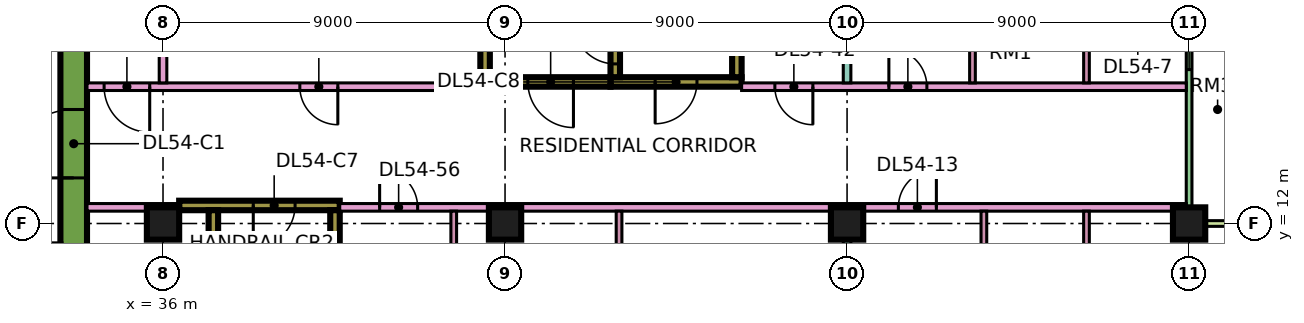
"""IFC4 building model, lengths in metres.
Left out: names, types, materials, properties, quantities, classifications, styles, units other than length and angle.
Written with IfcOpenShell. Run it as: python <this file> out.ifc"""

import sys

from ifc_helpers import new_model, si_unit, direction, frame, frame_2d, origin, origin_2d, place, context, subcontext, project, spatial, rectangle, extrude, element, fill, save


model = new_model("IFC4")
c1 = context("Model", 3, precision=1e-05, world=origin(), true_north=direction((0.0, 1.0)))
c2 = subcontext(c1, "Body", "Model", "MODEL_VIEW")
j1 = project(units=[si_unit("LENGTHUNIT", "METRE"), si_unit("PLANEANGLEUNIT", "RADIAN")], contexts=[c1])
p1 = place(None, origin())
s1 = spatial("IfcSite", under=j1, at=p1, CompositionType="ELEMENT")
p2 = place(p1, origin())
s2 = spatial("IfcBuilding", under=s1, at=p2, CompositionType="ELEMENT")
p3 = place(p2, frame((0.0, 0.0, 230.4)))
s3 = spatial("IfcBuildingStorey", under=s2, at=p3, CompositionType="ELEMENT", Elevation=230.4)
for number, where, z_axis, x_axis in (
    (1, (36.0, 12.0, 0.0), (0.0, 0.0, 1.0), (1.0, 0.0, 0.0)),
    (2, (45.0, 12.0, 0.0), (0.0, 0.0, 1.0), (1.0, 0.0, 0.0)),
    (3, (54.0, 12.0, 0.0), (0.0, 0.0, 1.0), (1.0, 0.0, 0.0)),
    (4, (63.0, 12.0, 0.0), (0.0, 0.0, 1.0), (1.0, 0.0, 0.0)),
):
    element("IfcColumn", number, at=place(p3, frame(where, z_axis=z_axis, x_axis=x_axis)), inside=s3, PredefinedType="COLUMN", context=c2, shape_type="SweptSolid", body=[
        extrude(rectangle(XDim=0.85, YDim=0.85, at=origin_2d()), origin(), (0.0, 0.0, 1.0), 3.75),
    ])
p4 = place(p3, frame((33.65, 7.7, 0.0), z_axis=(0.0, 0.0, 1.0), x_axis=(0.0, 1.0, 0.0)))
e5 = element("IfcWall", 5, at=p4, inside=s3, PredefinedType="SHEAR", context=c2, shape_type="SweptSolid", body=[
    extrude(rectangle(XDim=11.6, YDim=0.7, at=frame_2d((5.8, 0.0))), origin(), (0.0, 0.0, 1.0), 3.75),
])
p5 = place(p4, frame((5.5, 0.0, 0.0)))
e6 = element("IfcOpeningElement", 6, at=p5, cuts=e5, PredefinedType="OPENING", context=c2, shape_type="SweptSolid", body=[
    extrude(rectangle(XDim=1.8, YDim=2.4, at=frame_2d((0.9, 1.2))), frame((0.0, 0.36, 0.0), z_axis=(0.0, -1.0, 0.0), x_axis=(1.0, 0.0, 0.0)), (0.0, 0.0, 1.0), 0.72),
])
p6 = place(p3, frame((36.425, 12.475, 0.0), z_axis=(0.0, 0.0, 1.0), x_axis=(1.0, 0.0, 0.0)))
e7 = element("IfcWall", 7, at=p6, inside=s3, PredefinedType="SHEAR", context=c2, shape_type="SweptSolid", body=[
    extrude(rectangle(XDim=4.225, YDim=0.25, at=frame_2d((2.112, 0.0))), origin(), (0.0, 0.0, 1.0), 3.75),
])
p7 = place(p6, frame((1.95, 0.0, 0.0)))
e8 = element("IfcOpeningElement", 8, at=p7, cuts=e7, PredefinedType="OPENING", context=c2, shape_type="SweptSolid", body=[
    extrude(rectangle(XDim=1.1, YDim=2.2, at=frame_2d((0.55, 1.1))), frame((0.0, 0.135, 0.0), z_axis=(0.0, -1.0, 0.0), x_axis=(1.0, 0.0, 0.0)), (0.0, 0.0, 1.0), 0.27),
])
for number, where, z_axis, x_axis in (
    (9, (37.325, 5.85, 0.0), (0.0, 0.0, 1.0), (0.0, 1.0, 0.0)),
    (10, (40.525, 5.85, 0.0), (0.0, 0.0, 1.0), (0.0, 1.0, 0.0)),
):
    element("IfcWall", number, at=place(p3, frame(where, z_axis=z_axis, x_axis=x_axis)), inside=s3, PredefinedType="SHEAR", context=c2, shape_type="SweptSolid", body=[
        extrude(rectangle(XDim=6.5, YDim=0.25, at=frame_2d((3.25, 0.0))), origin(), (0.0, 0.0, 1.0), 3.75),
    ])
p8 = place(p3, frame((47.775, 15.725, 0.0), z_axis=(0.0, 0.0, 1.0), x_axis=(1.0, 0.0, 0.0)))
e11 = element("IfcWall", 11, at=p8, inside=s3, PredefinedType="SHEAR", context=c2, shape_type="SweptSolid", body=[
    extrude(rectangle(XDim=3.45, YDim=0.25, at=frame_2d((1.725, 0.0))), origin(), (0.0, 0.0, 1.0), 3.75),
])
p9 = place(p8, frame((1.175, 0.0, 0.0)))
e12 = element("IfcOpeningElement", 12, at=p9, cuts=e11, PredefinedType="OPENING", context=c2, shape_type="SweptSolid", body=[
    extrude(rectangle(XDim=1.1, YDim=2.2, at=frame_2d((0.55, 1.1))), frame((0.0, 0.135, 0.0), z_axis=(0.0, -1.0, 0.0), x_axis=(1.0, 0.0, 0.0)), (0.0, 0.0, 1.0), 0.27),
])
p10 = place(p3, frame((47.9, 15.85, 0.0), z_axis=(0.0, 0.0, 1.0), x_axis=(0.0, 1.0, 0.0)))
e13 = element("IfcWall", 13, at=p10, inside=s3, PredefinedType="SHEAR", context=c2, shape_type="SweptSolid", body=[
    extrude(rectangle(XDim=6.5, YDim=0.25, at=frame_2d((3.25, 0.0))), origin(), (0.0, 0.0, 1.0), 3.75),
])
p11 = place(p10, frame((0.35, 0.0, 0.0)))
e14 = element("IfcOpeningElement", 14, at=p11, cuts=e13, PredefinedType="OPENING", context=c2, shape_type="SweptSolid", body=[
    extrude(rectangle(XDim=1.1, YDim=2.2, at=frame_2d((0.55, 1.1))), frame((0.0, 0.135, 0.0), z_axis=(0.0, -1.0, 0.0), x_axis=(1.0, 0.0, 0.0)), (0.0, 0.0, 1.0), 0.27),
])
p12 = place(p3, frame((51.1, 15.85, 0.0), z_axis=(0.0, 0.0, 1.0), x_axis=(0.0, 1.0, 0.0)))
e15 = element("IfcWall", 15, at=p12, inside=s3, PredefinedType="SHEAR", context=c2, shape_type="SweptSolid", body=[
    extrude(rectangle(XDim=6.5, YDim=0.25, at=frame_2d((3.25, 0.0))), origin(), (0.0, 0.0, 1.0), 3.75),
])
p13 = place(p3, frame((44.35, 15.725, 0.0), z_axis=(0.0, 0.0, 1.0), x_axis=(1.0, 0.0, 0.0)))
e16 = element("IfcWall", 16, at=p13, inside=s3, PredefinedType="SHEAR", context=c2, shape_type="SweptSolid", body=[
    extrude(rectangle(XDim=3.425, YDim=0.25, at=frame_2d((1.712, 0.0))), origin(), (0.0, 0.0, 1.0), 3.75),
])
p14 = place(p13, frame((1.25, 0.0, 0.0)))
e17 = element("IfcOpeningElement", 17, at=p14, cuts=e16, PredefinedType="OPENING", context=c2, shape_type="SweptSolid", body=[
    extrude(rectangle(XDim=1.2, YDim=2.2, at=frame_2d((0.6, 1.1))), frame((0.0, 0.135, 0.0), z_axis=(0.0, -1.0, 0.0), x_axis=(1.0, 0.0, 0.0)), (0.0, 0.0, 1.0), 0.27),
])
p15 = place(p3, frame((44.475, 15.85, 0.0), z_axis=(0.0, 0.0, 1.0), x_axis=(0.0, 1.0, 0.0)))
e18 = element("IfcWall", 18, at=p15, inside=s3, PredefinedType="SHEAR", context=c2, shape_type="SweptSolid", body=[
    extrude(rectangle(XDim=6.5, YDim=0.25, at=frame_2d((3.25, 0.0))), origin(), (0.0, 0.0, 1.0), 3.75),
])
p16 = place(p15, frame((1.75, 0.0, 0.0)))
e19 = element("IfcOpeningElement", 19, at=p16, cuts=e18, PredefinedType="OPENING", context=c2, shape_type="SweptSolid", body=[
    extrude(rectangle(XDim=1.1, YDim=2.2, at=frame_2d((0.55, 1.1))), frame((0.0, 0.135, 0.0), z_axis=(0.0, -1.0, 0.0), x_axis=(1.0, 0.0, 0.0)), (0.0, 0.0, 1.0), 0.27),
])
p17 = place(p15, frame((4.3, 0.0, 0.0)))
e20 = element("IfcOpeningElement", 20, at=p17, cuts=e18, PredefinedType="OPENING", context=c2, shape_type="SweptSolid", body=[
    extrude(rectangle(XDim=1.1, YDim=2.2, at=frame_2d((0.55, 1.1))), frame((0.0, 0.135, 0.0), z_axis=(0.0, -1.0, 0.0), x_axis=(1.0, 0.0, 0.0)), (0.0, 0.0, 1.0), 0.27),
])
p18 = place(p3, frame((63.0, 12.075, 0.0), z_axis=(0.0, 0.0, 1.0), x_axis=(0.0, 1.0, 0.0)))
e21 = element("IfcWall", 21, at=p18, inside=s3, PredefinedType="SOLIDWALL", context=c2, shape_type="SweptSolid", body=[
    extrude(rectangle(XDim=10.35, YDim=0.15, at=frame_2d((5.175, 0.0))), origin(), (0.0, 0.0, 1.0), 3.35),
])
p19 = place(p18, frame((3.975, 0.0, 0.45)))
e22 = element("IfcOpeningElement", 22, at=p19, cuts=e21, PredefinedType="OPENING", context=c2, shape_type="SweptSolid", body=[
    extrude(rectangle(XDim=1.8, YDim=2.4, at=frame_2d((0.9, 1.2))), frame((0.0, 0.085, 0.0), z_axis=(0.0, -1.0, 0.0), x_axis=(1.0, 0.0, 0.0)), (0.0, 0.0, 1.0), 0.17),
])
p20 = place(p18, frame((7.387, 0.0, 0.0)))
e23 = element("IfcOpeningElement", 23, at=p20, cuts=e21, PredefinedType="OPENING", context=c2, shape_type="SweptSolid", body=[
    extrude(rectangle(XDim=1.8, YDim=2.4, at=frame_2d((0.9, 1.2))), frame((0.0, 0.085, 0.0), z_axis=(0.0, -1.0, 0.0), x_axis=(1.0, 0.0, 0.0)), (0.0, 0.0, 1.0), 0.17),
])
p21 = place(p3, frame((64.5, 12.0, 0.0), z_axis=(0.0, 0.0, 1.0), x_axis=(-1.0, 0.0, 0.0)))
e24 = element("IfcWall", 24, at=p21, inside=s3, PredefinedType="SOLIDWALL", context=c2, shape_type="SweptSolid", body=[
    extrude(rectangle(XDim=1.5, YDim=0.15, at=frame_2d((0.75, 0.0))), origin(), (0.0, 0.0, 1.0), 3.35),
])
p22 = place(p3, frame((34.0, 12.425, 0.0), z_axis=(0.0, 0.0, 1.0), x_axis=(1.0, 0.0, 0.0)))
e25 = element("IfcWall", 25, at=p22, inside=s3, PredefinedType="PARTITIONING", context=c2, shape_type="SweptSolid", body=[
    extrude(rectangle(XDim=2.426, YDim=0.2, at=frame_2d((1.213, 0.0))), origin(), (0.0, 0.0, 1.0), 3.35),
])
p23 = place(p3, frame((34.0, 15.6, 0.0), z_axis=(0.0, 0.0, 1.0), x_axis=(1.0, 0.0, 0.0)))
e26 = element("IfcWall", 26, at=p23, inside=s3, PredefinedType="PARTITIONING", context=c2, shape_type="SweptSolid", body=[
    extrude(rectangle(XDim=10.35, YDim=0.2, at=frame_2d((5.175, 0.0))), origin(), (0.0, 0.0, 1.0), 3.35),
])
p24 = place(p23, frame((5.6, 0.0, 0.0)))
e27 = element("IfcOpeningElement", 27, at=p24, cuts=e26, PredefinedType="OPENING", context=c2, shape_type="SweptSolid", body=[
    extrude(rectangle(XDim=1.0, YDim=2.1, at=frame_2d((0.5, 1.05))), frame((0.0, 0.11, 0.0), z_axis=(0.0, -1.0, 0.0), x_axis=(1.0, 0.0, 0.0)), (0.0, 0.0, 1.0), 0.22),
])
p25 = place(p23, frame((0.45, 0.0, 0.0)))
e28 = element("IfcOpeningElement", 28, at=p25, cuts=e26, PredefinedType="OPENING", context=c2, shape_type="SweptSolid", body=[
    extrude(rectangle(XDim=1.2, YDim=2.1, at=frame_2d((0.6, 1.05))), frame((0.0, 0.11, 0.0), z_axis=(0.0, -1.0, 0.0), x_axis=(1.0, 0.0, 0.0)), (0.0, 0.0, 1.0), 0.22),
])
p26 = place(p3, frame((36.0, 15.7, 0.0), z_axis=(0.0, 0.0, 1.0), x_axis=(0.0, 1.0, 0.0)))
e29 = element("IfcWall", 29, at=p26, inside=s3, PredefinedType="PARTITIONING", context=c2, shape_type="SweptSolid", body=[
    extrude(rectangle(XDim=8.3, YDim=0.2, at=frame_2d((4.15, 0.0))), origin(), (0.0, 0.0, 1.0), 3.35),
])
p27 = place(p3, frame((40.65, 12.425, 0.0), z_axis=(0.0, 0.0, 1.0), x_axis=(1.0, 0.0, 0.0)))
e30 = element("IfcWall", 30, at=p27, inside=s3, PredefinedType="PARTITIONING", context=c2, shape_type="SweptSolid", body=[
    extrude(rectangle(XDim=22.276, YDim=0.2, at=frame_2d((11.138, 0.0))), origin(), (0.0, 0.0, 1.0), 3.35),
])
p28 = place(p27, frame((14.7, 0.0, 0.0)))
e31 = element("IfcOpeningElement", 31, at=p28, cuts=e30, PredefinedType="OPENING", context=c2, shape_type="SweptSolid", body=[
    extrude(rectangle(XDim=1.0, YDim=2.1, at=frame_2d((0.5, 1.05))), frame((0.0, 0.11, 0.0), z_axis=(0.0, -1.0, 0.0), x_axis=(1.0, 0.0, 0.0)), (0.0, 0.0, 1.0), 0.22),
])
p29 = place(p27, frame((1.05, 0.0, 0.0)))
e32 = element("IfcOpeningElement", 32, at=p29, cuts=e30, PredefinedType="OPENING", context=c2, shape_type="SweptSolid", body=[
    extrude(rectangle(XDim=1.0, YDim=2.1, at=frame_2d((0.5, 1.05))), frame((0.0, 0.11, 0.0), z_axis=(0.0, -1.0, 0.0), x_axis=(1.0, 0.0, 0.0)), (0.0, 0.0, 1.0), 0.22),
])
p30 = place(p3, frame((43.65, 5.975, 0.0), z_axis=(0.0, 0.0, 1.0), x_axis=(0.0, 1.0, 0.0)))
e33 = element("IfcWall", 33, at=p30, inside=s3, PredefinedType="PARTITIONING", context=c2, shape_type="SweptSolid", body=[
    extrude(rectangle(XDim=6.35, YDim=0.15, at=frame_2d((3.175, 0.0))), origin(), (0.0, 0.0, 1.0), 3.35),
])
p31 = place(p30, frame((4.275, 0.0, 0.0)))
e34 = element("IfcOpeningElement", 34, at=p31, cuts=e33, PredefinedType="OPENING", context=c2, shape_type="SweptSolid", body=[
    extrude(rectangle(XDim=0.9, YDim=2.1, at=frame_2d((0.45, 1.05))), frame((0.0, 0.085, 0.0), z_axis=(0.0, -1.0, 0.0), x_axis=(1.0, 0.0, 0.0)), (0.0, 0.0, 1.0), 0.17),
])
p32 = place(p3, frame((48.0, 5.975, 0.0), z_axis=(0.0, 0.0, 1.0), x_axis=(0.0, 1.0, 0.0)))
e35 = element("IfcWall", 35, at=p32, inside=s3, PredefinedType="PARTITIONING", context=c2, shape_type="SweptSolid", body=[
    extrude(rectangle(XDim=6.35, YDim=0.15, at=frame_2d((3.175, 0.0))), origin(), (0.0, 0.0, 1.0), 3.35),
])
p33 = place(p3, frame((51.225, 15.6, 0.0), z_axis=(0.0, 0.0, 1.0), x_axis=(1.0, 0.0, 0.0)))
e36 = element("IfcWall", 36, at=p33, inside=s3, PredefinedType="PARTITIONING", context=c2, shape_type="SweptSolid", body=[
    extrude(rectangle(XDim=11.701, YDim=0.2, at=frame_2d((5.851, 0.0))), origin(), (0.0, 0.0, 1.0), 3.35),
])
p34 = place(p33, frame((3.875, 0.0, 0.0)))
e37 = element("IfcOpeningElement", 37, at=p34, cuts=e36, PredefinedType="OPENING", context=c2, shape_type="SweptSolid", body=[
    extrude(rectangle(XDim=1.0, YDim=2.1, at=frame_2d((0.5, 1.05))), frame((0.0, 0.11, 0.0), z_axis=(0.0, -1.0, 0.0), x_axis=(1.0, 0.0, 0.0)), (0.0, 0.0, 1.0), 0.22),
])
p35 = place(p33, frame((0.875, 0.0, 0.0)))
e38 = element("IfcOpeningElement", 38, at=p35, cuts=e36, PredefinedType="OPENING", context=c2, shape_type="SweptSolid", body=[
    extrude(rectangle(XDim=1.0, YDim=2.1, at=frame_2d((0.5, 1.05))), frame((0.0, 0.11, 0.0), z_axis=(0.0, -1.0, 0.0), x_axis=(1.0, 0.0, 0.0)), (0.0, 0.0, 1.0), 0.22),
])
p36 = place(p3, frame((54.0, -1.351, 0.0), z_axis=(0.0, 0.0, 1.0), x_axis=(0.0, 1.0, 0.0)))
e39 = element("IfcWall", 39, at=p36, inside=s3, PredefinedType="PARTITIONING", context=c2, shape_type="SweptSolid", body=[
    extrude(rectangle(XDim=13.676, YDim=0.2, at=frame_2d((6.838, 0.0))), origin(), (0.0, 0.0, 1.0), 3.35),
])
p37 = place(p3, frame((54.0, 15.7, 0.0), z_axis=(0.0, 0.0, 1.0), x_axis=(0.0, 1.0, 0.0)))
e40 = element("IfcWall", 40, at=p37, inside=s3, PredefinedType="PARTITIONING", context=c2, shape_type="SweptSolid", body=[
    extrude(rectangle(XDim=8.3, YDim=0.2, at=frame_2d((4.15, 0.0))), origin(), (0.0, 0.0, 1.0), 3.35),
])
p38 = place(p3, frame((57.3, 15.7, 0.0), z_axis=(0.0, 0.0, 1.0), x_axis=(0.0, 1.0, 0.0)))
e41 = element("IfcWall", 41, at=p38, inside=s3, PredefinedType="PARTITIONING", context=c2, shape_type="SweptSolid", body=[
    extrude(rectangle(XDim=2.525, YDim=0.15, at=frame_2d((1.263, 0.0))), origin(), (0.0, 0.0, 1.0), 3.35),
])
for number, where, z_axis, x_axis in (
    (42, (57.6, 7.7, 0.0), (0.0, 0.0, 1.0), (0.0, 1.0, 0.0)),
    (43, (60.3, 7.7, 0.0), (0.0, 0.0, 1.0), (0.0, 1.0, 0.0)),
):
    element("IfcWall", number, at=place(p3, frame(where, z_axis=z_axis, x_axis=x_axis)), inside=s3, PredefinedType="PARTITIONING", context=c2, shape_type="SweptSolid", body=[
        extrude(rectangle(XDim=4.625, YDim=0.15, at=frame_2d((2.312, 0.0))), origin(), (0.0, 0.0, 1.0), 3.35),
    ])
p39 = place(p3, frame((60.3, 15.7, 0.0), z_axis=(0.0, 0.0, 1.0), x_axis=(0.0, 1.0, 0.0)))
e44 = element("IfcWall", 44, at=p39, inside=s3, PredefinedType="PARTITIONING", context=c2, shape_type="SweptSolid", body=[
    extrude(rectangle(XDim=2.525, YDim=0.15, at=frame_2d((1.263, 0.0))), origin(), (0.0, 0.0, 1.0), 3.35),
])
p40 = place(p19, origin())
e45 = element("IfcWindow", 45, at=p40, inside=s3, PartitioningType="SINGLE_PANEL", PredefinedType="WINDOW", context=c2, shape_type="SweptSolid", body=[
    extrude(rectangle(XDim=1.8, YDim=2.4, at=frame_2d((0.9, 1.2))), frame((0.0, 0.03, 0.0), z_axis=(0.0, -1.0, 0.0), x_axis=(1.0, 0.0, 0.0)), (0.0, 0.0, 1.0), 0.06),
])
fill(e22, e45)
p41 = place(p5, origin())
e46 = element("IfcDoor", 46, at=p41, inside=s3, OperationType="DOUBLE_DOOR_SINGLE_SWING", PredefinedType="DOOR", context=c2, shape_type="SweptSolid", body=[
    extrude(rectangle(XDim=1.8, YDim=2.4, at=frame_2d((0.9, 1.2))), frame((0.0, 0.025, 0.0), z_axis=(0.0, -1.0, 0.0), x_axis=(1.0, 0.0, 0.0)), (0.0, 0.0, 1.0), 0.05),
])
fill(e6, e46)
p42 = place(p7, frame((1.1, 0.0, 0.0), z_axis=(0.0, 0.0, 1.0), x_axis=(-1.0, 0.0, 0.0)))
e47 = element("IfcDoor", 47, at=p42, inside=s3, OperationType="SINGLE_SWING_LEFT", PredefinedType="DOOR", context=c2, shape_type="SweptSolid", body=[
    extrude(rectangle(XDim=1.1, YDim=2.2, at=frame_2d((0.55, 1.1))), frame((0.0, 0.025, 0.0), z_axis=(0.0, -1.0, 0.0), x_axis=(1.0, 0.0, 0.0)), (0.0, 0.0, 1.0), 0.05),
])
fill(e8, e47)
p43 = place(p9, frame((1.1, 0.0, 0.0), z_axis=(0.0, 0.0, 1.0), x_axis=(-1.0, 0.0, 0.0)))
e48 = element("IfcDoor", 48, at=p43, inside=s3, OperationType="SINGLE_SWING_LEFT", PredefinedType="DOOR", context=c2, shape_type="SweptSolid", body=[
    extrude(rectangle(XDim=1.1, YDim=2.2, at=frame_2d((0.55, 1.1))), frame((0.0, 0.025, 0.0), z_axis=(0.0, -1.0, 0.0), x_axis=(1.0, 0.0, 0.0)), (0.0, 0.0, 1.0), 0.05),
])
fill(e12, e48)
p44 = place(p14, origin())
e49 = element("IfcDoor", 49, at=p44, inside=s3, OperationType="SINGLE_SWING_RIGHT", PredefinedType="DOOR", context=c2, shape_type="SweptSolid", body=[
    extrude(rectangle(XDim=1.2, YDim=2.2, at=frame_2d((0.6, 1.1))), frame((0.0, 0.025, 0.0), z_axis=(0.0, -1.0, 0.0), x_axis=(1.0, 0.0, 0.0)), (0.0, 0.0, 1.0), 0.05),
])
fill(e17, e49)
p45 = place(p11, frame((1.1, 0.0, 0.0), z_axis=(0.0, 0.0, 1.0), x_axis=(-1.0, 0.0, 0.0)))
e50 = element("IfcDoor", 50, at=p45, inside=s3, OperationType="SINGLE_SWING_RIGHT", PredefinedType="DOOR", context=c2, shape_type="SweptSolid", body=[
    extrude(rectangle(XDim=1.1, YDim=2.2, at=frame_2d((0.55, 1.1))), frame((0.0, 0.025, 0.0), z_axis=(0.0, -1.0, 0.0), x_axis=(1.0, 0.0, 0.0)), (0.0, 0.0, 1.0), 0.05),
])
fill(e14, e50)
p46 = place(p24, origin())
e51 = element("IfcDoor", 51, at=p46, inside=s3, OperationType="SINGLE_SWING_RIGHT", PredefinedType="DOOR", context=c2, shape_type="SweptSolid", body=[
    extrude(rectangle(XDim=1.0, YDim=2.1, at=frame_2d((0.5, 1.05))), frame((0.0, 0.025, 0.0), z_axis=(0.0, -1.0, 0.0), x_axis=(1.0, 0.0, 0.0)), (0.0, 0.0, 1.0), 0.05),
])
fill(e27, e51)
p47 = place(p34, origin())
e52 = element("IfcDoor", 52, at=p47, inside=s3, OperationType="SINGLE_SWING_LEFT", PredefinedType="DOOR", context=c2, shape_type="SweptSolid", body=[
    extrude(rectangle(XDim=1.0, YDim=2.1, at=frame_2d((0.5, 1.05))), frame((0.0, 0.025, 0.0), z_axis=(0.0, -1.0, 0.0), x_axis=(1.0, 0.0, 0.0)), (0.0, 0.0, 1.0), 0.05),
])
fill(e37, e52)
p48 = place(p28, frame((1.0, 0.0, 0.0), z_axis=(0.0, 0.0, 1.0), x_axis=(-1.0, 0.0, 0.0)))
e53 = element("IfcDoor", 53, at=p48, inside=s3, OperationType="SINGLE_SWING_RIGHT", PredefinedType="DOOR", context=c2, shape_type="SweptSolid", body=[
    extrude(rectangle(XDim=1.0, YDim=2.1, at=frame_2d((0.5, 1.05))), frame((0.0, 0.025, 0.0), z_axis=(0.0, -1.0, 0.0), x_axis=(1.0, 0.0, 0.0)), (0.0, 0.0, 1.0), 0.05),
])
fill(e31, e53)
p49 = place(p25, origin())
e54 = element("IfcDoor", 54, at=p49, inside=s3, OperationType="SINGLE_SWING_RIGHT", PredefinedType="DOOR", context=c2, shape_type="SweptSolid", body=[
    extrude(rectangle(XDim=1.2, YDim=2.1, at=frame_2d((0.6, 1.05))), frame((0.0, 0.025, 0.0), z_axis=(0.0, -1.0, 0.0), x_axis=(1.0, 0.0, 0.0)), (0.0, 0.0, 1.0), 0.05),
])
fill(e28, e54)
p50 = place(p35, origin())
e55 = element("IfcDoor", 55, at=p50, inside=s3, OperationType="SINGLE_SWING_RIGHT", PredefinedType="DOOR", context=c2, shape_type="SweptSolid", body=[
    extrude(rectangle(XDim=1.0, YDim=2.1, at=frame_2d((0.5, 1.05))), frame((0.0, 0.025, 0.0), z_axis=(0.0, -1.0, 0.0), x_axis=(1.0, 0.0, 0.0)), (0.0, 0.0, 1.0), 0.05),
])
fill(e38, e55)
p51 = place(p29, origin())
e56 = element("IfcDoor", 56, at=p51, inside=s3, OperationType="SINGLE_SWING_LEFT", PredefinedType="DOOR", context=c2, shape_type="SweptSolid", body=[
    extrude(rectangle(XDim=1.0, YDim=2.1, at=frame_2d((0.5, 1.05))), frame((0.0, 0.025, 0.0), z_axis=(0.0, -1.0, 0.0), x_axis=(1.0, 0.0, 0.0)), (0.0, 0.0, 1.0), 0.05),
])
fill(e32, e56)
save(model, sys.argv[1])
